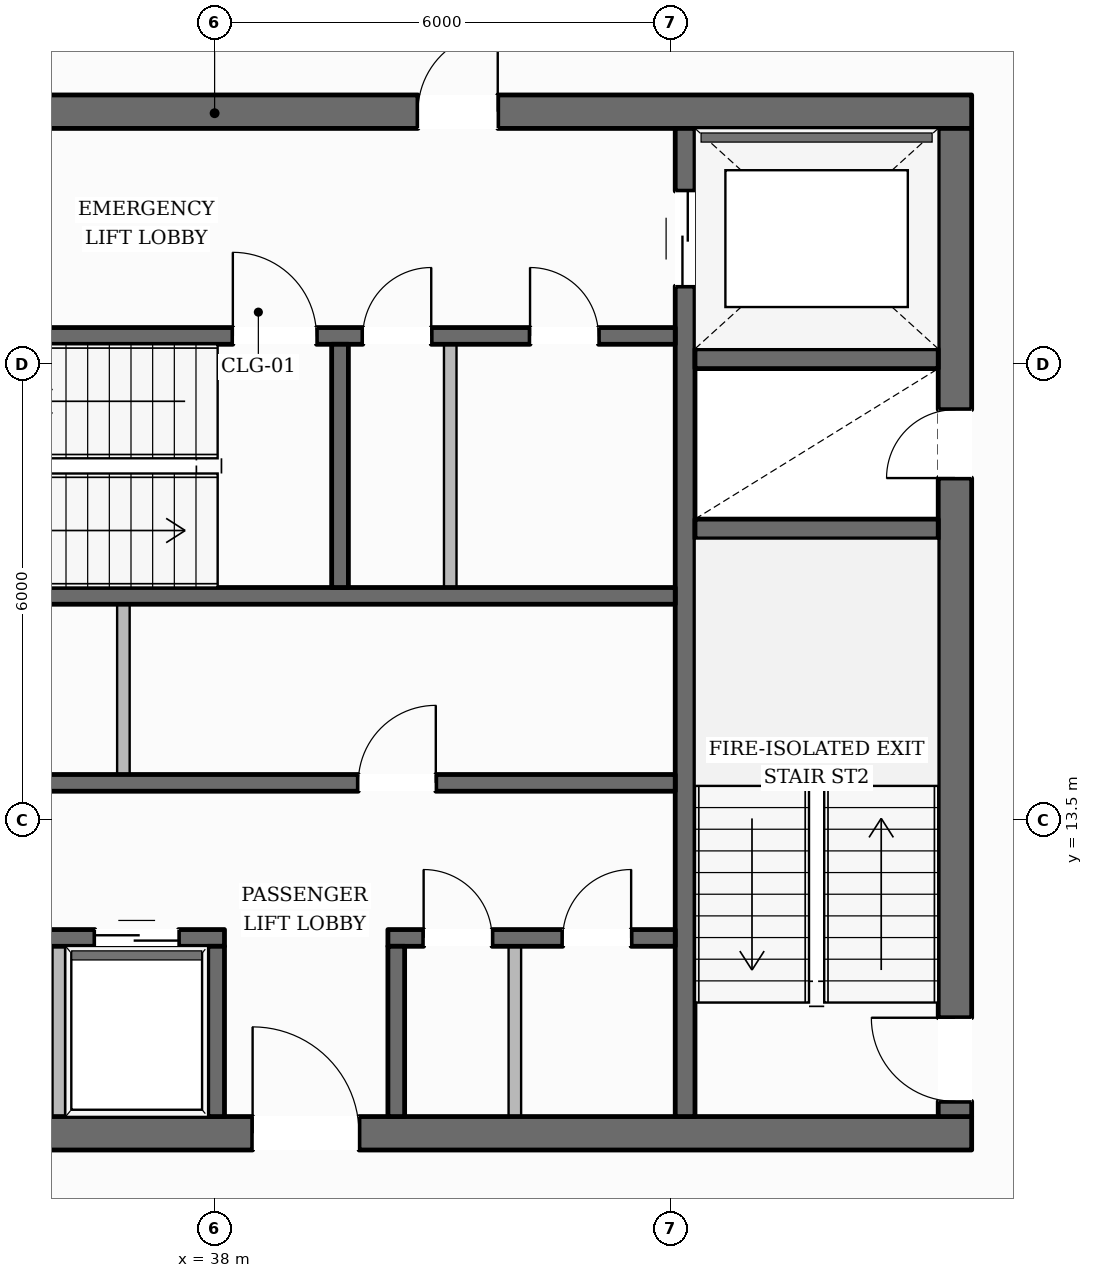
"""IFC4 building model, lengths in metres.
Left out: names, types, materials, properties, quantities, classifications, styles, units other than length and angle.
Written with IfcOpenShell. Run it as: python <this file> out.ifc"""

import sys

from ifc_helpers import new_model, si_unit, direction, frame, frame_2d, origin, place, context, subcontext, project, spatial, rectangle, extrude, element, fill, save


model = new_model("IFC4")
c1 = context("Model", 3, precision=1e-05, world=origin(), true_north=direction((0.0, 1.0)))
c2 = subcontext(c1, "Body", "Model", "MODEL_VIEW")
j1 = project(units=[si_unit("LENGTHUNIT", "METRE"), si_unit("PLANEANGLEUNIT", "RADIAN")], contexts=[c1])
p1 = place(None, origin())
s1 = spatial("IfcSite", under=j1, at=p1, CompositionType="ELEMENT")
p2 = place(p1, origin())
s2 = spatial("IfcBuilding", under=s1, at=p2, CompositionType="ELEMENT")
p3 = place(p2, frame((0.0, 0.0, 215.05)))
s3 = spatial("IfcBuildingStorey", under=s2, at=p3, CompositionType="ELEMENT", Elevation=215.05)
p4 = place(p3, frame((28.04, 9.38, 0.0), z_axis=(0.0, 0.0, 1.0), x_axis=(1.0, 0.0, 0.0)))
e1 = element("IfcWall", 1, at=p4, inside=s3, PredefinedType="SOLIDWALL", context=c2, shape_type="SweptSolid", body=[
    extrude(rectangle(XDim=19.92, YDim=0.44, at=frame_2d((9.96, 0.0))), origin(), (0.0, 0.0, 1.0), 3.6),
])
p5 = place(p4, frame((10.46, 0.0, 0.0)))
e2 = element("IfcOpeningElement", 2, at=p5, cuts=e1, PredefinedType="OPENING", context=c2, shape_type="SweptSolid", body=[
    extrude(rectangle(XDim=1.4, YDim=2.2, at=frame_2d((0.7, 1.1))), frame((0.0, 0.23, 0.0), z_axis=(0.0, -1.0, 0.0), x_axis=(1.0, 0.0, 0.0)), (0.0, 0.0, 1.0), 0.46),
])
p6 = place(p3, frame((28.04, 22.82, 0.0), z_axis=(0.0, 0.0, 1.0), x_axis=(1.0, 0.0, 0.0)))
e3 = element("IfcWall", 3, at=p6, inside=s3, PredefinedType="SOLIDWALL", context=c2, shape_type="SweptSolid", body=[
    extrude(rectangle(XDim=19.92, YDim=0.44, at=frame_2d((9.96, 0.0))), origin(), (0.0, 0.0, 1.0), 3.6),
])
p7 = place(p6, frame((6.235, 0.0, 0.0)))
e4 = element("IfcOpeningElement", 4, at=p7, cuts=e3, PredefinedType="OPENING", context=c2, shape_type="SweptSolid", body=[
    extrude(rectangle(XDim=1.05, YDim=2.15, at=frame_2d((0.525, 1.075))), frame((0.0, 0.23, 0.0), z_axis=(0.0, -1.0, 0.0), x_axis=(1.0, 0.0, 0.0)), (0.0, 0.0, 1.0), 0.46),
])
p8 = place(p6, frame((12.635, 0.0, 0.0)))
e5 = element("IfcOpeningElement", 5, at=p8, cuts=e3, PredefinedType="OPENING", context=c2, shape_type="SweptSolid", body=[
    extrude(rectangle(XDim=1.05, YDim=2.15, at=frame_2d((0.525, 1.075))), frame((0.0, 0.23, 0.0), z_axis=(0.0, -1.0, 0.0), x_axis=(1.0, 0.0, 0.0)), (0.0, 0.0, 1.0), 0.46),
])
p9 = place(p3, frame((47.74, 9.6, 0.0), z_axis=(0.0, 0.0, 1.0), x_axis=(0.0, 1.0, 0.0)))
e6 = element("IfcWall", 6, at=p9, inside=s3, PredefinedType="SOLIDWALL", context=c2, shape_type="SweptSolid", body=[
    extrude(rectangle(XDim=13.0, YDim=0.44, at=frame_2d((6.5, 0.0))), origin(), (0.0, 0.0, 1.0), 3.6),
])
p10 = place(p9, frame((0.2, 0.0, 0.0)))
e7 = element("IfcOpeningElement", 7, at=p10, cuts=e6, PredefinedType="OPENING", context=c2, shape_type="SweptSolid", body=[
    extrude(rectangle(XDim=1.1, YDim=2.15, at=frame_2d((0.55, 1.075))), frame((0.0, 0.23, 0.0), z_axis=(0.0, -1.0, 0.0), x_axis=(1.0, 0.0, 0.0)), (0.0, 0.0, 1.0), 0.46),
])
p11 = place(p9, frame((8.4, 0.0, 0.0)))
e8 = element("IfcOpeningElement", 8, at=p11, cuts=e6, PredefinedType="OPENING", context=c2, shape_type="SweptSolid", body=[
    extrude(rectangle(XDim=0.9, YDim=2.1, at=frame_2d((0.45, 1.05))), frame((0.0, 0.23, 0.0), z_axis=(0.0, -1.0, 0.0), x_axis=(1.0, 0.0, 0.0)), (0.0, 0.0, 1.0), 0.46),
])
p12 = place(p3, frame((44.19, 9.6, 0.0), z_axis=(0.0, 0.0, 1.0), x_axis=(0.0, 1.0, 0.0)))
e9 = element("IfcWall", 9, at=p12, inside=s3, PredefinedType="SHEAR", context=c2, shape_type="SweptSolid", body=[
    extrude(rectangle(XDim=13.0, YDim=0.26, at=frame_2d((6.5, 0.0))), origin(), (0.0, 0.0, 1.0), 3.6),
])
p13 = place(p12, frame((10.925, 0.0, 0.0)))
e10 = element("IfcOpeningElement", 10, at=p13, cuts=e9, PredefinedType="OPENING", context=c2, shape_type="SweptSolid", body=[
    extrude(rectangle(XDim=1.25, YDim=2.25, at=frame_2d((0.625, 1.125))), frame((0.0, 0.14, 0.0), z_axis=(0.0, -1.0, 0.0), x_axis=(1.0, 0.0, 0.0)), (0.0, 0.0, 1.0), 0.28),
])
for number, where, z_axis, x_axis in (
    (11, (44.32, 17.33, 0.0), (0.0, 0.0, 1.0), (1.0, 0.0, 0.0)),
    (12, (44.32, 19.57, 0.0), (0.0, 0.0, 1.0), (1.0, 0.0, 0.0)),
):
    element("IfcWall", number, at=place(p3, frame(where, z_axis=z_axis, x_axis=x_axis)), inside=s3, PredefinedType="SHEAR", context=c2, shape_type="SweptSolid", body=[
        extrude(rectangle(XDim=3.2, YDim=0.26, at=frame_2d((1.6, 0.0))), origin(), (0.0, 0.0, 1.0), 3.6),
    ])
p14 = place(p3, frame((31.94, 19.87, 0.0), z_axis=(0.0, 0.0, 1.0), x_axis=(1.0, 0.0, 0.0)))
e13 = element("IfcWall", 13, at=p14, inside=s3, PredefinedType="SOLIDWALL", context=c2, shape_type="SweptSolid", body=[
    extrude(rectangle(XDim=12.12, YDim=0.22, at=frame_2d((6.06, 0.0))), origin(), (0.0, 0.0, 1.0), 3.6),
])
p15 = place(p14, frame((6.3, 0.0, 0.0)))
e14 = element("IfcOpeningElement", 14, at=p15, cuts=e13, PredefinedType="OPENING", context=c2, shape_type="SweptSolid", body=[
    extrude(rectangle(XDim=1.1, YDim=2.15, at=frame_2d((0.55, 1.075))), frame((0.0, 0.12, 0.0), z_axis=(0.0, -1.0, 0.0), x_axis=(1.0, 0.0, 0.0)), (0.0, 0.0, 1.0), 0.24),
])
p16 = place(p14, frame((8.01, 0.0, 0.0)))
e15 = element("IfcOpeningElement", 15, at=p16, cuts=e13, PredefinedType="OPENING", context=c2, shape_type="SweptSolid", body=[
    extrude(rectangle(XDim=0.9, YDim=2.1, at=frame_2d((0.45, 1.05))), frame((0.0, 0.12, 0.0), z_axis=(0.0, -1.0, 0.0), x_axis=(1.0, 0.0, 0.0)), (0.0, 0.0, 1.0), 0.24),
])
p17 = place(p14, frame((10.21, 0.0, 0.0)))
e16 = element("IfcOpeningElement", 16, at=p17, cuts=e13, PredefinedType="OPENING", context=c2, shape_type="SweptSolid", body=[
    extrude(rectangle(XDim=0.9, YDim=2.1, at=frame_2d((0.45, 1.05))), frame((0.0, 0.12, 0.0), z_axis=(0.0, -1.0, 0.0), x_axis=(1.0, 0.0, 0.0)), (0.0, 0.0, 1.0), 0.24),
])
p18 = place(p3, frame((31.94, 16.45, 0.0), z_axis=(0.0, 0.0, 1.0), x_axis=(1.0, 0.0, 0.0)))
e17 = element("IfcWall", 17, at=p18, inside=s3, PredefinedType="SOLIDWALL", context=c2, shape_type="SweptSolid", body=[
    extrude(rectangle(XDim=12.12, YDim=0.22, at=frame_2d((6.06, 0.0))), origin(), (0.0, 0.0, 1.0), 3.6),
])
p19 = place(p3, frame((39.65, 16.56, 0.0), z_axis=(0.0, 0.0, 1.0), x_axis=(0.0, 1.0, 0.0)))
e18 = element("IfcWall", 18, at=p19, inside=s3, PredefinedType="SOLIDWALL", context=c2, shape_type="SweptSolid", body=[
    extrude(rectangle(XDim=3.2, YDim=0.22, at=frame_2d((1.6, 0.0))), origin(), (0.0, 0.0, 1.0), 3.6),
])
p20 = place(p3, frame((31.94, 13.99, 0.0), z_axis=(0.0, 0.0, 1.0), x_axis=(1.0, 0.0, 0.0)))
e19 = element("IfcWall", 19, at=p20, inside=s3, PredefinedType="SOLIDWALL", context=c2, shape_type="SweptSolid", body=[
    extrude(rectangle(XDim=12.12, YDim=0.22, at=frame_2d((6.06, 0.0))), origin(), (0.0, 0.0, 1.0), 3.6),
])
p21 = place(p20, frame((1.91, 0.0, 0.0)))
e20 = element("IfcOpeningElement", 20, at=p21, cuts=e19, PredefinedType="OPENING", context=c2, shape_type="SweptSolid", body=[
    extrude(rectangle(XDim=0.9, YDim=2.1, at=frame_2d((0.45, 1.05))), frame((0.0, 0.12, 0.0), z_axis=(0.0, -1.0, 0.0), x_axis=(1.0, 0.0, 0.0)), (0.0, 0.0, 1.0), 0.24),
])
p22 = place(p20, frame((7.95, 0.0, 0.0)))
e21 = element("IfcOpeningElement", 21, at=p22, cuts=e19, PredefinedType="OPENING", context=c2, shape_type="SweptSolid", body=[
    extrude(rectangle(XDim=1.02, YDim=2.15, at=frame_2d((0.51, 1.075))), frame((0.0, 0.12, 0.0), z_axis=(0.0, -1.0, 0.0), x_axis=(1.0, 0.0, 0.0)), (0.0, 0.0, 1.0), 0.24),
])
p23 = place(p3, frame((31.94, 11.95, 0.0), z_axis=(0.0, 0.0, 1.0), x_axis=(1.0, 0.0, 0.0)))
e22 = element("IfcWall", 22, at=p23, inside=s3, PredefinedType="SOLIDWALL", context=c2, shape_type="SweptSolid", body=[
    extrude(rectangle(XDim=6.19, YDim=0.22, at=frame_2d((3.095, 0.0))), origin(), (0.0, 0.0, 1.0), 3.6),
])
p24 = place(p23, frame((0.385, 0.0, 0.0)))
e23 = element("IfcOpeningElement", 23, at=p24, cuts=e22, PredefinedType="OPENING", context=c2, shape_type="SweptSolid", body=[
    extrude(rectangle(XDim=1.1, YDim=2.2, at=frame_2d((0.55, 1.1))), frame((0.0, 0.12, 0.0), z_axis=(0.0, -1.0, 0.0), x_axis=(1.0, 0.0, 0.0)), (0.0, 0.0, 1.0), 0.24),
])
p25 = place(p23, frame((2.435, 0.0, 0.0)))
e24 = element("IfcOpeningElement", 24, at=p25, cuts=e22, PredefinedType="OPENING", context=c2, shape_type="SweptSolid", body=[
    extrude(rectangle(XDim=1.1, YDim=2.2, at=frame_2d((0.55, 1.1))), frame((0.0, 0.12, 0.0), z_axis=(0.0, -1.0, 0.0), x_axis=(1.0, 0.0, 0.0)), (0.0, 0.0, 1.0), 0.24),
])
p26 = place(p23, frame((4.485, 0.0, 0.0)))
e25 = element("IfcOpeningElement", 25, at=p26, cuts=e22, PredefinedType="OPENING", context=c2, shape_type="SweptSolid", body=[
    extrude(rectangle(XDim=1.1, YDim=2.2, at=frame_2d((0.55, 1.1))), frame((0.0, 0.12, 0.0), z_axis=(0.0, -1.0, 0.0), x_axis=(1.0, 0.0, 0.0)), (0.0, 0.0, 1.0), 0.24),
])
p27 = place(p3, frame((40.28, 11.95, 0.0), z_axis=(0.0, 0.0, 1.0), x_axis=(1.0, 0.0, 0.0)))
e26 = element("IfcWall", 26, at=p27, inside=s3, PredefinedType="SOLIDWALL", context=c2, shape_type="SweptSolid", body=[
    extrude(rectangle(XDim=3.78, YDim=0.22, at=frame_2d((1.89, 0.0))), origin(), (0.0, 0.0, 1.0), 3.6),
])
p28 = place(p27, frame((0.47, 0.0, 0.0)))
e27 = element("IfcOpeningElement", 27, at=p28, cuts=e26, PredefinedType="OPENING", context=c2, shape_type="SweptSolid", body=[
    extrude(rectangle(XDim=0.9, YDim=2.1, at=frame_2d((0.45, 1.05))), frame((0.0, 0.12, 0.0), z_axis=(0.0, -1.0, 0.0), x_axis=(1.0, 0.0, 0.0)), (0.0, 0.0, 1.0), 0.24),
])
p29 = place(p27, frame((2.3, 0.0, 0.0)))
e28 = element("IfcOpeningElement", 28, at=p29, cuts=e26, PredefinedType="OPENING", context=c2, shape_type="SweptSolid", body=[
    extrude(rectangle(XDim=0.9, YDim=2.1, at=frame_2d((0.45, 1.05))), frame((0.0, 0.12, 0.0), z_axis=(0.0, -1.0, 0.0), x_axis=(1.0, 0.0, 0.0)), (0.0, 0.0, 1.0), 0.24),
])
for number, where, z_axis, x_axis in (
    (29, (38.02, 9.6, 0.0), (0.0, 0.0, 1.0), (0.0, 1.0, 0.0)),
    (30, (40.39, 9.6, 0.0), (0.0, 0.0, 1.0), (0.0, 1.0, 0.0)),
):
    element("IfcWall", number, at=place(p3, frame(where, z_axis=z_axis, x_axis=x_axis)), inside=s3, PredefinedType="SOLIDWALL", context=c2, shape_type="SweptSolid", body=[
        extrude(rectangle(XDim=2.24, YDim=0.22, at=frame_2d((1.12, 0.0))), origin(), (0.0, 0.0, 1.0), 3.6),
    ])
p30 = place(p3, frame((41.969, 44.54, 0.0), z_axis=(0.0, 0.0, 1.0), x_axis=(0.498884596562, -0.866668425243, 0.0)))
e31 = element("IfcWall", 31, at=p30, inside=s3, PredefinedType="STANDARD", context=c2, shape_type="SweptSolid", body=[
    extrude(rectangle(XDim=38.412, YDim=0.35, at=frame_2d((19.206, 0.0))), origin(), (0.0, 0.0, 1.0), 3.132),
])
p31 = place(p30, frame((34.087, 0.0, 0.65)))
e32 = element("IfcOpeningElement", 32, at=p31, cuts=e31, PredefinedType="OPENING", context=c2, shape_type="SweptSolid", body=[
    extrude(rectangle(XDim=1.45, YDim=1.75, at=frame_2d((0.725, 0.875))), frame((0.0, 0.185, 0.0), z_axis=(0.0, -1.0, 0.0), x_axis=(1.0, 0.0, 0.0)), (0.0, 0.0, 1.0), 0.37),
])
p32 = place(p30, frame((27.845, 0.0, 0.65)))
e33 = element("IfcOpeningElement", 33, at=p32, cuts=e31, PredefinedType="OPENING", context=c2, shape_type="SweptSolid", body=[
    extrude(rectangle(XDim=1.45, YDim=1.75, at=frame_2d((0.725, 0.875))), frame((0.0, 0.185, 0.0), z_axis=(0.0, -1.0, 0.0), x_axis=(1.0, 0.0, 0.0)), (0.0, 0.0, 1.0), 0.37),
])
p33 = place(p30, frame((21.603, 0.0, 0.65)))
e34 = element("IfcOpeningElement", 34, at=p33, cuts=e31, PredefinedType="OPENING", context=c2, shape_type="SweptSolid", body=[
    extrude(rectangle(XDim=1.45, YDim=1.75, at=frame_2d((0.725, 0.875))), frame((0.0, 0.185, 0.0), z_axis=(0.0, -1.0, 0.0), x_axis=(1.0, 0.0, 0.0)), (0.0, 0.0, 1.0), 0.37),
])
p34 = place(p30, frame((9.119, 0.0, 0.65)))
e35 = element("IfcOpeningElement", 35, at=p34, cuts=e31, PredefinedType="OPENING", context=c2, shape_type="SweptSolid", body=[
    extrude(rectangle(XDim=1.45, YDim=1.75, at=frame_2d((0.725, 0.875))), frame((0.0, 0.185, 0.0), z_axis=(0.0, -1.0, 0.0), x_axis=(1.0, 0.0, 0.0)), (0.0, 0.0, 1.0), 0.37),
])
p35 = place(p30, frame((2.876, 0.0, 0.65)))
e36 = element("IfcOpeningElement", 36, at=p35, cuts=e31, PredefinedType="OPENING", context=c2, shape_type="SweptSolid", body=[
    extrude(rectangle(XDim=1.45, YDim=1.75, at=frame_2d((0.725, 0.875))), frame((0.0, 0.185, 0.0), z_axis=(0.0, -1.0, 0.0), x_axis=(1.0, 0.0, 0.0)), (0.0, 0.0, 1.0), 0.37),
])
p36 = place(p3, frame((35.95, 9.52, 0.0), z_axis=(0.0, 0.0, 1.0), x_axis=(0.0, 1.0, 0.0)))
e37 = element("IfcWall", 37, at=p36, inside=s3, PredefinedType="PARTITIONING", context=c2, shape_type="SweptSolid", body=[
    extrude(rectangle(XDim=2.32, YDim=0.165, at=frame_2d((1.16, 0.0))), origin(), (0.0, 0.0, 1.0), 3.6),
])
p37 = place(p3, frame((36.8, 14.1, 0.0), z_axis=(0.0, 0.0, 1.0), x_axis=(0.0, 1.0, 0.0)))
e38 = element("IfcWall", 38, at=p37, inside=s3, PredefinedType="PARTITIONING", context=c2, shape_type="SweptSolid", body=[
    extrude(rectangle(XDim=2.24, YDim=0.165, at=frame_2d((1.12, 0.0))), origin(), (0.0, 0.0, 1.0), 3.6),
])
p38 = place(p3, frame((41.1, 16.56, 0.0), z_axis=(0.0, 0.0, 1.0), x_axis=(0.0, 1.0, 0.0)))
e39 = element("IfcWall", 39, at=p38, inside=s3, PredefinedType="PARTITIONING", context=c2, shape_type="SweptSolid", body=[
    extrude(rectangle(XDim=3.2, YDim=0.165, at=frame_2d((1.6, 0.0))), origin(), (0.0, 0.0, 1.0), 3.6),
])
p39 = place(p3, frame((41.95, 9.52, 0.0), z_axis=(0.0, 0.0, 1.0), x_axis=(0.0, 1.0, 0.0)))
e40 = element("IfcWall", 40, at=p39, inside=s3, PredefinedType="PARTITIONING", context=c2, shape_type="SweptSolid", body=[
    extrude(rectangle(XDim=2.32, YDim=0.165, at=frame_2d((1.16, 0.0))), origin(), (0.0, 0.0, 1.0), 3.6),
])
p40 = place(p10, origin())
e41 = element("IfcDoor", 41, at=p40, inside=s3, OperationType="SINGLE_SWING_RIGHT", PredefinedType="DOOR", context=c2, shape_type="SweptSolid", body=[
    extrude(rectangle(XDim=1.1, YDim=2.15, at=frame_2d((0.55, 1.075))), frame((0.0, 0.025, 0.0), z_axis=(0.0, -1.0, 0.0), x_axis=(1.0, 0.0, 0.0)), (0.0, 0.0, 1.0), 0.05),
])
fill(e7, e41)
p41 = place(p15, origin())
e42 = element("IfcDoor", 42, at=p41, inside=s3, OperationType="SINGLE_SWING_LEFT", PredefinedType="DOOR", context=c2, shape_type="SweptSolid", body=[
    extrude(rectangle(XDim=1.1, YDim=2.15, at=frame_2d((0.55, 1.075))), frame((0.0, 0.025, 0.0), z_axis=(0.0, -1.0, 0.0), x_axis=(1.0, 0.0, 0.0)), (0.0, 0.0, 1.0), 0.05),
])
fill(e14, e42)
p42 = place(p11, origin())
e43 = element("IfcDoor", 43, at=p42, inside=s3, OperationType="SINGLE_SWING_LEFT", PredefinedType="DOOR", context=c2, shape_type="SweptSolid", body=[
    extrude(rectangle(XDim=0.9, YDim=2.1, at=frame_2d((0.45, 1.05))), frame((0.0, 0.025, 0.0), z_axis=(0.0, -1.0, 0.0), x_axis=(1.0, 0.0, 0.0)), (0.0, 0.0, 1.0), 0.05),
])
fill(e8, e43)
p43 = place(p8, origin())
e44 = element("IfcDoor", 44, at=p43, inside=s3, OperationType="SINGLE_SWING_RIGHT", PredefinedType="DOOR", context=c2, shape_type="SweptSolid", body=[
    extrude(rectangle(XDim=1.05, YDim=2.15, at=frame_2d((0.525, 1.075))), frame((0.0, 0.025, 0.0), z_axis=(0.0, -1.0, 0.0), x_axis=(1.0, 0.0, 0.0)), (0.0, 0.0, 1.0), 0.05),
])
fill(e5, e44)
p44 = place(p13, origin())
e45 = element("IfcDoor", 45, at=p44, inside=s3, OperationType="DOUBLE_DOOR_SLIDING", PredefinedType="DOOR", context=c2, shape_type="SweptSolid", body=[
    extrude(rectangle(XDim=1.25, YDim=2.25, at=frame_2d((0.625, 1.125))), frame((0.0, 0.025, 0.0), z_axis=(0.0, -1.0, 0.0), x_axis=(1.0, 0.0, 0.0)), (0.0, 0.0, 1.0), 0.05),
])
fill(e10, e45)
p45 = place(p5, origin())
e46 = element("IfcDoor", 46, at=p45, inside=s3, OperationType="SINGLE_SWING_LEFT", PredefinedType="DOOR", context=c2, shape_type="SweptSolid", body=[
    extrude(rectangle(XDim=1.4, YDim=2.2, at=frame_2d((0.7, 1.1))), frame((0.0, 0.025, 0.0), z_axis=(0.0, -1.0, 0.0), x_axis=(1.0, 0.0, 0.0)), (0.0, 0.0, 1.0), 0.05),
])
fill(e2, e46)
p46 = place(p26, origin())
e47 = element("IfcDoor", 47, at=p46, inside=s3, OperationType="DOUBLE_DOOR_SLIDING", PredefinedType="DOOR", context=c2, shape_type="SweptSolid", body=[
    extrude(rectangle(XDim=1.1, YDim=2.2, at=frame_2d((0.55, 1.1))), frame((0.0, 0.025, 0.0), z_axis=(0.0, -1.0, 0.0), x_axis=(1.0, 0.0, 0.0)), (0.0, 0.0, 1.0), 0.05),
])
fill(e25, e47)
p47 = place(p22, origin())
e48 = element("IfcDoor", 48, at=p47, inside=s3, OperationType="SINGLE_SWING_RIGHT", PredefinedType="DOOR", context=c2, shape_type="SweptSolid", body=[
    extrude(rectangle(XDim=1.02, YDim=2.15, at=frame_2d((0.51, 1.075))), frame((0.0, 0.025, 0.0), z_axis=(0.0, -1.0, 0.0), x_axis=(1.0, 0.0, 0.0)), (0.0, 0.0, 1.0), 0.05),
])
fill(e21, e48)
p48 = place(p16, origin())
e49 = element("IfcDoor", 49, at=p48, inside=s3, OperationType="SINGLE_SWING_RIGHT", PredefinedType="DOOR", context=c2, shape_type="SweptSolid", body=[
    extrude(rectangle(XDim=0.9, YDim=2.1, at=frame_2d((0.45, 1.05))), frame((0.0, 0.025, 0.0), z_axis=(0.0, -1.0, 0.0), x_axis=(1.0, 0.0, 0.0)), (0.0, 0.0, 1.0), 0.05),
])
fill(e15, e49)
p49 = place(p17, origin())
e50 = element("IfcDoor", 50, at=p49, inside=s3, OperationType="SINGLE_SWING_LEFT", PredefinedType="DOOR", context=c2, shape_type="SweptSolid", body=[
    extrude(rectangle(XDim=0.9, YDim=2.1, at=frame_2d((0.45, 1.05))), frame((0.0, 0.025, 0.0), z_axis=(0.0, -1.0, 0.0), x_axis=(1.0, 0.0, 0.0)), (0.0, 0.0, 1.0), 0.05),
])
fill(e16, e50)
p50 = place(p28, origin())
e51 = element("IfcDoor", 51, at=p50, inside=s3, OperationType="SINGLE_SWING_LEFT", PredefinedType="DOOR", context=c2, shape_type="SweptSolid", body=[
    extrude(rectangle(XDim=0.9, YDim=2.1, at=frame_2d((0.45, 1.05))), frame((0.0, 0.025, 0.0), z_axis=(0.0, -1.0, 0.0), x_axis=(1.0, 0.0, 0.0)), (0.0, 0.0, 1.0), 0.05),
])
fill(e27, e51)
p51 = place(p29, origin())
e52 = element("IfcDoor", 52, at=p51, inside=s3, OperationType="SINGLE_SWING_RIGHT", PredefinedType="DOOR", context=c2, shape_type="SweptSolid", body=[
    extrude(rectangle(XDim=0.9, YDim=2.1, at=frame_2d((0.45, 1.05))), frame((0.0, 0.025, 0.0), z_axis=(0.0, -1.0, 0.0), x_axis=(1.0, 0.0, 0.0)), (0.0, 0.0, 1.0), 0.05),
])
fill(e28, e52)
save(model, sys.argv[1])
